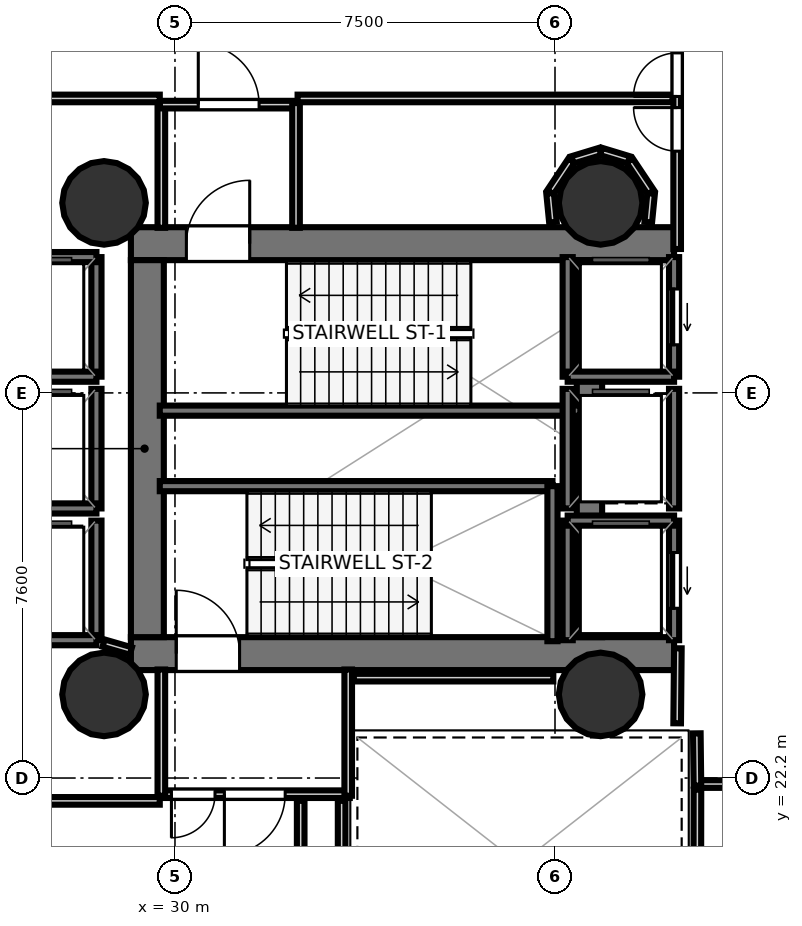
"""IFC4 building model, lengths in metres.
Left out: names, types, materials, properties, quantities, classifications, styles, units other than length and angle.
Written with IfcOpenShell. Run it as: python <this file> out.ifc"""

import sys

from ifc_helpers import new_model, si_unit, direction, frame, frame_2d, origin, origin_2d, place, context, subcontext, project, spatial, rectangle, hollow_circle, extrude, element, fill, save


model = new_model("IFC4")
c1 = context("Model", 3, precision=1e-05, world=origin(), true_north=direction((0.0, 1.0)))
c2 = subcontext(c1, "Body", "Model", "MODEL_VIEW")
j1 = project(units=[si_unit("LENGTHUNIT", "METRE"), si_unit("PLANEANGLEUNIT", "RADIAN")], contexts=[c1])
p1 = place(None, origin())
s1 = spatial("IfcSite", under=j1, at=p1, CompositionType="ELEMENT")
p2 = place(p1, origin())
s2 = spatial("IfcBuilding", under=s1, at=p2, CompositionType="ELEMENT")
p3 = place(p2, frame((0.0, 0.0, 93.2)))
s3 = spatial("IfcBuildingStorey", under=s2, at=p3, CompositionType="ELEMENT", Elevation=93.2)
p4 = place(p3, frame((29.13, 32.745, 0.0), z_axis=(0.0, 0.0, 1.0), x_axis=(1.0, 0.0, 0.0)))
e1 = element("IfcWall", 1, at=p4, inside=s3, PredefinedType="SHEAR", context=c2, shape_type="SweptSolid", body=[
    extrude(rectangle(XDim=10.72, YDim=0.65, at=frame_2d((5.36, 0.0))), origin(), (0.0, 0.0, 1.0), 4.42),
])
p5 = place(p4, frame((1.095, 0.0, 0.0)))
e2 = element("IfcOpeningElement", 2, at=p5, cuts=e1, PredefinedType="OPENING", context=c2, shape_type="SweptSolid", body=[
    extrude(rectangle(XDim=1.25, YDim=2.15, at=frame_2d((0.625, 1.075))), frame((0.0, 0.335, 0.0), z_axis=(0.0, -1.0, 0.0), x_axis=(1.0, 0.0, 0.0)), (0.0, 0.0, 1.0), 0.67),
])
p6 = place(p3, frame((29.13, 24.655, 0.0), z_axis=(0.0, 0.0, 1.0), x_axis=(1.0, 0.0, 0.0)))
e3 = element("IfcWall", 3, at=p6, inside=s3, PredefinedType="SHEAR", context=c2, shape_type="SweptSolid", body=[
    extrude(rectangle(XDim=10.72, YDim=0.65, at=frame_2d((5.36, 0.0))), origin(), (0.0, 0.0, 1.0), 4.42),
])
p7 = place(p6, frame((0.895, 0.0, 0.0)))
e4 = element("IfcOpeningElement", 4, at=p7, cuts=e3, PredefinedType="OPENING", context=c2, shape_type="SweptSolid", body=[
    extrude(rectangle(XDim=1.25, YDim=2.15, at=frame_2d((0.625, 1.075))), frame((0.0, 0.335, 0.0), z_axis=(0.0, -1.0, 0.0), x_axis=(1.0, 0.0, 0.0)), (0.0, 0.0, 1.0), 0.67),
])
p8 = place(p3, frame((29.455, 24.98, 0.0), z_axis=(0.0, 0.0, 1.0), x_axis=(0.0, 1.0, 0.0)))
e5 = element("IfcWall", 5, at=p8, inside=s3, PredefinedType="SHEAR", context=c2, shape_type="SweptSolid", body=[
    extrude(rectangle(XDim=7.44, YDim=0.65, at=frame_2d((3.72, 0.0))), origin(), (0.0, 0.0, 1.0), 4.42),
])
p9 = place(p3, frame((38.18, 24.98, 0.0), z_axis=(0.0, 0.0, 1.0), x_axis=(0.0, 1.0, 0.0)))
e6 = element("IfcWall", 6, at=p9, inside=s3, PredefinedType="SHEAR", context=c2, shape_type="SweptSolid", body=[
    extrude(rectangle(XDim=7.44, YDim=0.5, at=frame_2d((3.72, 0.0))), origin(), (0.0, 0.0, 1.0), 4.42),
])
for number, where, z_axis, x_axis in (
    (7, (28.6, 33.55, 0.0), (0.0, 0.0, 1.0), (1.0, 0.0, 0.0)),
    (8, (28.6, 23.85, 0.0), (0.0, 0.0, 1.0), (1.0, 0.0, 0.0)),
    (9, (38.4, 33.55, 0.0), (0.0, 0.0, 1.0), (1.0, 0.0, 0.0)),
    (10, (38.4, 23.85, 0.0), (0.0, 0.0, 1.0), (1.0, 0.0, 0.0)),
):
    element("IfcColumn", number, at=place(p3, frame(where, z_axis=z_axis, x_axis=x_axis)), inside=s3, PredefinedType="COLUMN", context=c2, shape_type="SweptSolid", body=[
        extrude(hollow_circle(Radius=0.825, WallThickness=0.04, at=origin_2d()), origin(), (0.0, 0.0, 1.0), 4.6),
    ])
p10 = place(p3, frame((29.7, 29.45, 0.0), z_axis=(0.0, 0.0, 1.0), x_axis=(1.0, 0.0, 0.0)))
e11 = element("IfcWall", 11, at=p10, inside=s3, PredefinedType="SOLIDWALL", context=c2, shape_type="SweptSolid", body=[
    extrude(rectangle(XDim=8.3, YDim=0.2, at=frame_2d((4.15, 0.0))), origin(), (0.0, 0.0, 1.0), 4.42),
])
p11 = place(p3, frame((29.7, 27.96, 0.0), z_axis=(0.0, 0.0, 1.0), x_axis=(1.0, 0.0, 0.0)))
e12 = element("IfcWall", 12, at=p11, inside=s3, PredefinedType="SOLIDWALL", context=c2, shape_type="SweptSolid", body=[
    extrude(rectangle(XDim=7.75, YDim=0.2, at=frame_2d((3.875, 0.0))), origin(), (0.0, 0.0, 1.0), 4.42),
])
p12 = place(p3, frame((37.45, 24.9, 0.0), z_axis=(0.0, 0.0, 1.0), x_axis=(0.0, 1.0, 0.0)))
e13 = element("IfcWall", 13, at=p12, inside=s3, PredefinedType="SOLIDWALL", context=c2, shape_type="SweptSolid", body=[
    extrude(rectangle(XDim=3.06, YDim=0.2, at=frame_2d((1.53, 0.0))), origin(), (0.0, 0.0, 1.0), 4.42),
])
p13 = place(p3, frame((39.85, 30.12, 0.0), z_axis=(0.0, 0.0, 1.0), x_axis=(0.0, 1.0, 0.0)))
e14 = element("IfcWall", 14, at=p13, inside=s3, PredefinedType="SOLIDWALL", context=c2, shape_type="SweptSolid", body=[
    extrude(rectangle(XDim=2.36, YDim=0.2, at=frame_2d((1.18, 0.0))), origin(), (0.0, 0.0, 1.0), 4.42),
])
p14 = place(p13, frame((0.63, 0.0, 0.0)))
e15 = element("IfcOpeningElement", 15, at=p14, cuts=e14, PredefinedType="OPENING", context=c2, shape_type="SweptSolid", body=[
    extrude(rectangle(XDim=1.1, YDim=2.15, at=frame_2d((0.55, 1.075))), frame((0.0, 0.11, 0.0), z_axis=(0.0, -1.0, 0.0), x_axis=(1.0, 0.0, 0.0)), (0.0, 0.0, 1.0), 0.22),
])
p15 = place(p3, frame((37.75, 30.12, 0.0), z_axis=(0.0, 0.0, 1.0), x_axis=(0.0, 1.0, 0.0)))
e16 = element("IfcWall", 16, at=p15, inside=s3, PredefinedType="SOLIDWALL", context=c2, shape_type="SweptSolid", body=[
    extrude(rectangle(XDim=2.36, YDim=0.2, at=frame_2d((1.18, 0.0))), origin(), (0.0, 0.0, 1.0), 4.42),
])
p16 = place(p3, frame((37.75, 30.12, 0.0), z_axis=(0.0, 0.0, 1.0), x_axis=(1.0, 0.0, 0.0)))
e17 = element("IfcWall", 17, at=p16, inside=s3, PredefinedType="SOLIDWALL", context=c2, shape_type="SweptSolid", body=[
    extrude(rectangle(XDim=2.1, YDim=0.2, at=frame_2d((1.05, 0.0))), origin(), (0.0, 0.0, 1.0), 4.42),
])
p17 = place(p3, frame((39.85, 24.92, 0.0), z_axis=(0.0, 0.0, 1.0), x_axis=(0.0, 1.0, 0.0)))
e18 = element("IfcWall", 18, at=p17, inside=s3, PredefinedType="SOLIDWALL", context=c2, shape_type="SweptSolid", body=[
    extrude(rectangle(XDim=2.36, YDim=0.2, at=frame_2d((1.18, 0.0))), origin(), (0.0, 0.0, 1.0), 4.42),
])
p18 = place(p17, frame((0.63, 0.0, 0.0)))
e19 = element("IfcOpeningElement", 19, at=p18, cuts=e18, PredefinedType="OPENING", context=c2, shape_type="SweptSolid", body=[
    extrude(rectangle(XDim=1.1, YDim=2.15, at=frame_2d((0.55, 1.075))), frame((0.0, 0.11, 0.0), z_axis=(0.0, -1.0, 0.0), x_axis=(1.0, 0.0, 0.0)), (0.0, 0.0, 1.0), 0.22),
])
p19 = place(p3, frame((37.75, 24.92, 0.0), z_axis=(0.0, 0.0, 1.0), x_axis=(0.0, 1.0, 0.0)))
e20 = element("IfcWall", 20, at=p19, inside=s3, PredefinedType="SOLIDWALL", context=c2, shape_type="SweptSolid", body=[
    extrude(rectangle(XDim=2.36, YDim=0.2, at=frame_2d((1.18, 0.0))), origin(), (0.0, 0.0, 1.0), 4.42),
])
p20 = place(p3, frame((37.75, 27.28, 0.0), z_axis=(0.0, 0.0, 1.0), x_axis=(1.0, 0.0, 0.0)))
e21 = element("IfcWall", 21, at=p20, inside=s3, PredefinedType="SOLIDWALL", context=c2, shape_type="SweptSolid", body=[
    extrude(rectangle(XDim=2.1, YDim=0.2, at=frame_2d((1.05, 0.0))), origin(), (0.0, 0.0, 1.0), 4.42),
])
p21 = place(p3, frame((28.45, 30.12, 0.0), z_axis=(0.0, 0.0, 1.0), x_axis=(0.0, 1.0, 0.0)))
e22 = element("IfcWall", 22, at=p21, inside=s3, PredefinedType="SOLIDWALL", context=c2, shape_type="SweptSolid", body=[
    extrude(rectangle(XDim=2.36, YDim=0.2, at=frame_2d((1.18, 0.0))), origin(), (0.0, 0.0, 1.0), 4.42),
])
for number, where, z_axis, x_axis in (
    (23, (26.35, 32.48, 0.0), (0.0, 0.0, 1.0), (1.0, 0.0, 0.0)),
    (24, (26.35, 30.12, 0.0), (0.0, 0.0, 1.0), (1.0, 0.0, 0.0)),
):
    element("IfcWall", number, at=place(p3, frame(where, z_axis=z_axis, x_axis=x_axis)), inside=s3, PredefinedType="SOLIDWALL", context=c2, shape_type="SweptSolid", body=[
        extrude(rectangle(XDim=2.1, YDim=0.2, at=frame_2d((1.05, 0.0))), origin(), (0.0, 0.0, 1.0), 4.42),
    ])
p22 = place(p3, frame((28.45, 27.52, 0.0), z_axis=(0.0, 0.0, 1.0), x_axis=(0.0, 1.0, 0.0)))
e25 = element("IfcWall", 25, at=p22, inside=s3, PredefinedType="SOLIDWALL", context=c2, shape_type="SweptSolid", body=[
    extrude(rectangle(XDim=2.36, YDim=0.2, at=frame_2d((1.18, 0.0))), origin(), (0.0, 0.0, 1.0), 4.42),
])
p23 = place(p3, frame((26.35, 27.52, 0.0), z_axis=(0.0, 0.0, 1.0), x_axis=(1.0, 0.0, 0.0)))
e26 = element("IfcWall", 26, at=p23, inside=s3, PredefinedType="SOLIDWALL", context=c2, shape_type="SweptSolid", body=[
    extrude(rectangle(XDim=2.1, YDim=0.2, at=frame_2d((1.05, 0.0))), origin(), (0.0, 0.0, 1.0), 4.42),
])
p24 = place(p3, frame((28.45, 24.92, 0.0), z_axis=(0.0, 0.0, 1.0), x_axis=(0.0, 1.0, 0.0)))
e27 = element("IfcWall", 27, at=p24, inside=s3, PredefinedType="SOLIDWALL", context=c2, shape_type="SweptSolid", body=[
    extrude(rectangle(XDim=2.36, YDim=0.2, at=frame_2d((1.18, 0.0))), origin(), (0.0, 0.0, 1.0), 4.42),
])
p25 = place(p3, frame((26.35, 24.92, 0.0), z_axis=(0.0, 0.0, 1.0), x_axis=(1.0, 0.0, 0.0)))
e28 = element("IfcWall", 28, at=p25, inside=s3, PredefinedType="SOLIDWALL", context=c2, shape_type="SweptSolid", body=[
    extrude(rectangle(XDim=2.1, YDim=0.2, at=frame_2d((1.05, 0.0))), origin(), (0.0, 0.0, 1.0), 4.42),
])
for number, where, z_axis, x_axis in (
    (29, (39.85, 27.52, 0.0), (0.0, 0.0, 1.0), (0.0, 1.0, 0.0)),
    (30, (37.75, 27.52, 0.0), (0.0, 0.0, 1.0), (0.0, 1.0, 0.0)),
):
    element("IfcWall", number, at=place(p3, frame(where, z_axis=z_axis, x_axis=x_axis)), inside=s3, PredefinedType="SOLIDWALL", context=c2, shape_type="SweptSolid", body=[
        extrude(rectangle(XDim=2.36, YDim=0.2, at=frame_2d((1.18, 0.0))), origin(), (0.0, 0.0, 1.0), 4.42),
    ])
p26 = place(p3, frame((29.731, 33.058, 0.0), z_axis=(0.0, 0.0, 1.0), x_axis=(0.0, 1.0, 0.0)))
e31 = element("IfcWall", 31, at=p26, inside=s3, PredefinedType="PARTITIONING", context=c2, shape_type="SweptSolid", body=[
    extrude(rectangle(XDim=2.462, YDim=0.15, at=frame_2d((1.231, 0.0))), origin(), (0.0, 0.0, 1.0), 2.94),
])
p27 = place(p3, frame((29.7, 35.489, 0.0), z_axis=(0.0, 0.0, 1.0), x_axis=(1.0, 0.0, 0.0)))
e32 = element("IfcWall", 32, at=p27, inside=s3, PredefinedType="PARTITIONING", context=c2, shape_type="SweptSolid", body=[
    extrude(rectangle(XDim=2.72, YDim=0.15, at=frame_2d((1.36, 0.0))), origin(), (0.0, 0.0, 1.0), 2.94),
])
p28 = place(p27, frame((0.76, 0.0, 0.0)))
e33 = element("IfcOpeningElement", 33, at=p28, cuts=e32, PredefinedType="OPENING", context=c2, shape_type="SweptSolid", body=[
    extrude(rectangle(XDim=1.2, YDim=2.15, at=frame_2d((0.6, 1.075))), frame((0.0, 0.085, 0.0), z_axis=(0.0, -1.0, 0.0), x_axis=(1.0, 0.0, 0.0)), (0.0, 0.0, 1.0), 0.17),
])
p29 = place(p3, frame((32.389, 35.52, 0.0), z_axis=(0.0, 0.0, 1.0), x_axis=(0.0, -1.0, 0.0)))
e34 = element("IfcWall", 34, at=p29, inside=s3, PredefinedType="PARTITIONING", context=c2, shape_type="SweptSolid", body=[
    extrude(rectangle(XDim=2.462, YDim=0.15, at=frame_2d((1.231, 0.0))), origin(), (0.0, 0.0, 1.0), 2.94),
])
p30 = place(p3, frame((33.45, 21.881, 0.0), z_axis=(0.0, 0.0, 1.0), x_axis=(-1.0, 0.0, 0.0)))
e35 = element("IfcWall", 35, at=p30, inside=s3, PredefinedType="PARTITIONING", context=c2, shape_type="SweptSolid", body=[
    extrude(rectangle(XDim=3.75, YDim=0.15, at=frame_2d((1.875, 0.0))), origin(), (0.0, 0.0, 1.0), 2.94),
])
p31 = place(p30, frame((1.275, 0.0, 0.0)))
e36 = element("IfcOpeningElement", 36, at=p31, cuts=e35, PredefinedType="OPENING", context=c2, shape_type="SweptSolid", body=[
    extrude(rectangle(XDim=1.2, YDim=2.15, at=frame_2d((0.6, 1.075))), frame((0.0, 0.085, 0.0), z_axis=(0.0, -1.0, 0.0), x_axis=(1.0, 0.0, 0.0)), (0.0, 0.0, 1.0), 0.17),
])
p32 = place(p30, frame((2.66, 0.0, 0.0)))
e37 = element("IfcOpeningElement", 37, at=p32, cuts=e35, PredefinedType="OPENING", context=c2, shape_type="SweptSolid", body=[
    extrude(rectangle(XDim=0.86, YDim=2.05, at=frame_2d((0.43, 1.025))), frame((0.0, 0.085, 0.0), z_axis=(0.0, -1.0, 0.0), x_axis=(1.0, 0.0, 0.0)), (0.0, 0.0, 1.0), 0.17),
])
for number, where, z_axis, x_axis in (
    (38, (29.731, 21.85, 0.0), (0.0, 0.0, 1.0), (0.0, 1.0, 0.0)),
    (39, (33.419, 24.342, 0.0), (0.0, 0.0, 1.0), (0.0, -1.0, 0.0)),
):
    element("IfcWall", number, at=place(p3, frame(where, z_axis=z_axis, x_axis=x_axis)), inside=s3, PredefinedType="PARTITIONING", context=c2, shape_type="SweptSolid", body=[
        extrude(rectangle(XDim=2.492, YDim=0.15, at=frame_2d((1.246, 0.0))), origin(), (0.0, 0.0, 1.0), 2.94),
    ])
p33 = place(p3, frame((39.911, 32.64, 0.0), z_axis=(0.0, 0.0, 1.0), x_axis=(0.0, 1.0, 0.0)))
e40 = element("IfcWall", 40, at=p33, inside=s3, PredefinedType="PARTITIONING", context=c2, shape_type="SweptSolid", body=[
    extrude(rectangle(XDim=4.01, YDim=0.15, at=frame_2d((2.005, 0.0))), origin(), (0.0, 0.0, 1.0), 2.94),
])
p34 = place(p33, frame((3.01, 0.0, 0.0)))
e41 = element("IfcOpeningElement", 41, at=p34, cuts=e40, PredefinedType="OPENING", context=c2, shape_type="SweptSolid", body=[
    extrude(rectangle(XDim=0.86, YDim=2.05, at=frame_2d((0.43, 1.025))), frame((0.0, 0.085, 0.0), z_axis=(0.0, -1.0, 0.0), x_axis=(1.0, 0.0, 0.0)), (0.0, 0.0, 1.0), 0.17),
])
p35 = place(p33, frame((1.93, 0.0, 0.0)))
e42 = element("IfcOpeningElement", 42, at=p35, cuts=e40, PredefinedType="OPENING", context=c2, shape_type="SweptSolid", body=[
    extrude(rectangle(XDim=0.86, YDim=2.05, at=frame_2d((0.43, 1.025))), frame((0.0, 0.085, 0.0), z_axis=(0.0, -1.0, 0.0), x_axis=(1.0, 0.0, 0.0)), (0.0, 0.0, 1.0), 0.17),
])
p36 = place(p3, frame((41.36, 22.081, 0.0), z_axis=(0.0, 0.0, 1.0), x_axis=(-1.0, 0.0, 0.0)))
e43 = element("IfcWall", 43, at=p36, inside=s3, PredefinedType="PARTITIONING", context=c2, shape_type="SweptSolid", body=[
    extrude(rectangle(XDim=1.08, YDim=0.15, at=frame_2d((0.54, 0.0))), origin(), (0.0, 0.0, 1.0), 2.94),
])
p37 = place(p3, frame((40.311, 22.05, 0.0), z_axis=(0.0, 0.0, 1.0), x_axis=(-0.011836292006, 0.999929948642, 0.0)))
e44 = element("IfcWall", 44, at=p37, inside=s3, PredefinedType="PARTITIONING", context=c2, shape_type="SweptSolid", body=[
    extrude(rectangle(XDim=1.031, YDim=0.15, at=frame_2d((0.516, 0.0))), origin(), (0.0, 0.0, 1.0), 2.94),
])
p38 = place(p3, frame((39.911, 23.28, 0.0), z_axis=(0.0, 0.0, 1.0), x_axis=(0.009397771291, 0.999955839972, 0.0)))
e45 = element("IfcWall", 45, at=p38, inside=s3, PredefinedType="PARTITIONING", context=c2, shape_type="SweptSolid", body=[
    extrude(rectangle(XDim=1.481, YDim=0.15, at=frame_2d((0.74, 0.0))), origin(), (0.0, 0.0, 1.0), 2.94),
])
p39 = place(p3, frame((29.13, 24.706, 0.0), z_axis=(0.0, 0.0, 1.0), x_axis=(-0.960451214223, 0.278448316742, 0.0)))
e46 = element("IfcWall", 46, at=p39, inside=s3, PredefinedType="PARTITIONING", context=c2, shape_type="SweptSolid", body=[
    extrude(rectangle(XDim=0.562, YDim=0.15, at=frame_2d((0.281, 0.0))), origin(), (0.0, 0.0, 1.0), 2.94),
])
p40 = place(p3, frame((37.467, 24.181, 0.0), z_axis=(0.0, 0.0, 1.0), x_axis=(-1.0, 0.0, 0.0)))
e47 = element("IfcWall", 47, at=p40, inside=s3, PredefinedType="PARTITIONING", context=c2, shape_type="SweptSolid", body=[
    extrude(rectangle(XDim=3.937, YDim=0.15, at=frame_2d((1.968, 0.0))), origin(), (0.0, 0.0, 1.0), 2.94),
])
p41 = place(p3, frame((32.481, 17.65, 0.0), z_axis=(0.0, 0.0, 1.0), x_axis=(0.0, 1.0, 0.0)))
e48 = element("IfcWall", 48, at=p41, inside=s3, PredefinedType="PARTITIONING", context=c2, shape_type="SweptSolid", body=[
    extrude(rectangle(XDim=4.1, YDim=0.15, at=frame_2d((2.05, 0.0))), origin(), (0.0, 0.0, 1.0), 2.94),
])
p42 = place(p41, frame((1.45, 0.0, 0.0)))
e49 = element("IfcOpeningElement", 49, at=p42, cuts=e48, PredefinedType="OPENING", context=c2, shape_type="SweptSolid", body=[
    extrude(rectangle(XDim=1.2, YDim=2.15, at=frame_2d((0.6, 1.075))), frame((0.0, 0.085, 0.0), z_axis=(0.0, -1.0, 0.0), x_axis=(1.0, 0.0, 0.0)), (0.0, 0.0, 1.0), 0.17),
])
p43 = place(p3, frame((33.289, 21.75, 0.0), z_axis=(0.0, 0.0, 1.0), x_axis=(0.0, -1.0, 0.0)))
e50 = element("IfcWall", 50, at=p43, inside=s3, PredefinedType="PARTITIONING", context=c2, shape_type="SweptSolid", body=[
    extrude(rectangle(XDim=3.75, YDim=0.15, at=frame_2d((1.875, 0.0))), origin(), (0.0, 0.0, 1.0), 2.94),
])
p44 = place(p3, frame((39.818, 35.611, 0.0), z_axis=(0.0, 0.0, 1.0), x_axis=(-1.0, 0.0, 0.0)))
e51 = element("IfcWall", 51, at=p44, inside=s3, PredefinedType="PARTITIONING", context=c2, shape_type="SweptSolid", body=[
    extrude(rectangle(XDim=7.398, YDim=0.15, at=frame_2d((3.699, 0.0))), origin(), (0.0, 0.0, 1.0), 2.94),
])
for number, where, z_axis, x_axis in (
    (52, (29.7, 35.611, 0.0), (0.0, 0.0, 1.0), (-1.0, 0.0, 0.0)),
    (53, (26.45, 21.749, 0.0), (0.0, 0.0, 1.0), (1.0, 0.0, 0.0)),
):
    element("IfcWall", number, at=place(p3, frame(where, z_axis=z_axis, x_axis=x_axis)), inside=s3, PredefinedType="PARTITIONING", context=c2, shape_type="SweptSolid", body=[
        extrude(rectangle(XDim=3.25, YDim=0.15, at=frame_2d((1.625, 0.0))), origin(), (0.0, 0.0, 1.0), 2.94),
    ])
p45 = place(p3, frame((40.306, 17.945, 0.0), z_axis=(0.0, 0.0, 1.0), x_axis=(0.001334545369, 0.999999109494, 0.0)))
e54 = element("IfcWall", 54, at=p45, inside=s3, PredefinedType="PARTITIONING", context=c2, shape_type="SweptSolid", body=[
    extrude(rectangle(XDim=4.025, YDim=0.15, at=frame_2d((2.012, 0.0))), origin(), (0.0, 0.0, 1.0), 2.94),
])
p46 = place(p3, frame((39.341, 33.17, 0.0), z_axis=(0.0, 0.0, 1.0), x_axis=(0.098193262045, 0.995167364461, 0.0)))
e55 = element("IfcWall", 55, at=p46, inside=s3, PredefinedType="PARTITIONING", context=c2, shape_type="SweptSolid", body=[
    extrude(rectangle(XDim=0.572, YDim=0.15, at=frame_2d((0.286, 0.0))), origin(), (0.0, 0.0, 1.0), 2.94),
])
p47 = place(p3, frame((39.392, 33.76, 0.0), z_axis=(0.0, 0.0, 1.0), x_axis=(-0.555746078923, 0.831352088926, 0.0)))
e56 = element("IfcWall", 56, at=p47, inside=s3, PredefinedType="PARTITIONING", context=c2, shape_type="SweptSolid", body=[
    extrude(rectangle(XDim=0.754, YDim=0.15, at=frame_2d((0.377, 0.0))), origin(), (0.0, 0.0, 1.0), 2.94),
])
for number, where, z_axis, x_axis in (
    (57, (38.956, 34.399, 0.0), (0.0, 0.0, 1.0), (-0.957, 0.29, 0.0)),
    (58, (38.391, 34.565, 0.0), (0.0, 0.0, 1.0), (-0.957, -0.29, 0.0)),
):
    element("IfcWall", number, at=place(p3, frame(where, z_axis=z_axis, x_axis=x_axis)), inside=s3, PredefinedType="PARTITIONING", context=c2, shape_type="SweptSolid", body=[
        extrude(rectangle(XDim=0.572, YDim=0.15, at=frame_2d((0.286, 0.0))), origin(), (0.0, 0.0, 1.0), 2.94),
    ])
p48 = place(p3, frame((37.827, 34.386, 0.0), z_axis=(0.0, 0.0, 1.0), x_axis=(-0.555522182913, -0.831501716349, 0.0)))
e59 = element("IfcWall", 59, at=p48, inside=s3, PredefinedType="PARTITIONING", context=c2, shape_type="SweptSolid", body=[
    extrude(rectangle(XDim=0.754, YDim=0.15, at=frame_2d((0.377, 0.0))), origin(), (0.0, 0.0, 1.0), 2.94),
])
p49 = place(p3, frame((37.403, 33.739, 0.0), z_axis=(0.0, 0.0, 1.0), x_axis=(0.097770424665, -0.995208995167, 0.0)))
e60 = element("IfcWall", 60, at=p49, inside=s3, PredefinedType="PARTITIONING", context=c2, shape_type="SweptSolid", body=[
    extrude(rectangle(XDim=0.572, YDim=0.15, at=frame_2d((0.286, 0.0))), origin(), (0.0, 0.0, 1.0), 2.94),
])
p50 = place(p5, origin())
e61 = element("IfcDoor", 61, at=p50, inside=s3, OperationType="SINGLE_SWING_RIGHT", PredefinedType="DOOR", context=c2, shape_type="SweptSolid", body=[
    extrude(rectangle(XDim=1.25, YDim=2.15, at=frame_2d((0.625, 1.075))), frame((0.0, 0.025, 0.0), z_axis=(0.0, -1.0, 0.0), x_axis=(1.0, 0.0, 0.0)), (0.0, 0.0, 1.0), 0.05),
])
fill(e2, e61)
p51 = place(p7, origin())
e62 = element("IfcDoor", 62, at=p51, inside=s3, OperationType="SINGLE_SWING_LEFT", PredefinedType="DOOR", context=c2, shape_type="SweptSolid", body=[
    extrude(rectangle(XDim=1.25, YDim=2.15, at=frame_2d((0.625, 1.075))), frame((0.0, 0.025, 0.0), z_axis=(0.0, -1.0, 0.0), x_axis=(1.0, 0.0, 0.0)), (0.0, 0.0, 1.0), 0.05),
])
fill(e4, e62)
p52 = place(p14, origin())
e63 = element("IfcDoor", 63, at=p52, inside=s3, OperationType="SLIDING_TO_LEFT", PredefinedType="DOOR", context=c2, shape_type="SweptSolid", body=[
    extrude(rectangle(XDim=1.1, YDim=2.15, at=frame_2d((0.55, 1.075))), frame((0.0, 0.025, 0.0), z_axis=(0.0, -1.0, 0.0), x_axis=(1.0, 0.0, 0.0)), (0.0, 0.0, 1.0), 0.05),
])
fill(e15, e63)
p53 = place(p18, origin())
e64 = element("IfcDoor", 64, at=p53, inside=s3, OperationType="SLIDING_TO_LEFT", PredefinedType="DOOR", context=c2, shape_type="SweptSolid", body=[
    extrude(rectangle(XDim=1.1, YDim=2.15, at=frame_2d((0.55, 1.075))), frame((0.0, 0.025, 0.0), z_axis=(0.0, -1.0, 0.0), x_axis=(1.0, 0.0, 0.0)), (0.0, 0.0, 1.0), 0.05),
])
fill(e19, e64)
p54 = place(p28, origin())
e65 = element("IfcDoor", 65, at=p54, inside=s3, OperationType="SINGLE_SWING_LEFT", PredefinedType="DOOR", context=c2, shape_type="SweptSolid", body=[
    extrude(rectangle(XDim=1.2, YDim=2.15, at=frame_2d((0.6, 1.075))), frame((0.0, 0.025, 0.0), z_axis=(0.0, -1.0, 0.0), x_axis=(1.0, 0.0, 0.0)), (0.0, 0.0, 1.0), 0.05),
])
fill(e33, e65)
p55 = place(p31, origin())
e66 = element("IfcDoor", 66, at=p55, inside=s3, OperationType="SINGLE_SWING_RIGHT", PredefinedType="DOOR", context=c2, shape_type="SweptSolid", body=[
    extrude(rectangle(XDim=1.2, YDim=2.15, at=frame_2d((0.6, 1.075))), frame((0.0, 0.025, 0.0), z_axis=(0.0, -1.0, 0.0), x_axis=(1.0, 0.0, 0.0)), (0.0, 0.0, 1.0), 0.05),
])
fill(e36, e66)
p56 = place(p34, origin())
e67 = element("IfcDoor", 67, at=p56, inside=s3, OperationType="SINGLE_SWING_LEFT", PredefinedType="DOOR", context=c2, shape_type="SweptSolid", body=[
    extrude(rectangle(XDim=0.86, YDim=2.05, at=frame_2d((0.43, 1.025))), frame((0.0, 0.025, 0.0), z_axis=(0.0, -1.0, 0.0), x_axis=(1.0, 0.0, 0.0)), (0.0, 0.0, 1.0), 0.05),
])
fill(e41, e67)
p57 = place(p32, origin())
e68 = element("IfcDoor", 68, at=p57, inside=s3, OperationType="SINGLE_SWING_RIGHT", PredefinedType="DOOR", context=c2, shape_type="SweptSolid", body=[
    extrude(rectangle(XDim=0.86, YDim=2.05, at=frame_2d((0.43, 1.025))), frame((0.0, 0.025, 0.0), z_axis=(0.0, -1.0, 0.0), x_axis=(1.0, 0.0, 0.0)), (0.0, 0.0, 1.0), 0.05),
])
fill(e37, e68)
p58 = place(p35, origin())
e69 = element("IfcDoor", 69, at=p58, inside=s3, OperationType="SINGLE_SWING_RIGHT", PredefinedType="DOOR", context=c2, shape_type="SweptSolid", body=[
    extrude(rectangle(XDim=0.86, YDim=2.05, at=frame_2d((0.43, 1.025))), frame((0.0, 0.025, 0.0), z_axis=(0.0, -1.0, 0.0), x_axis=(1.0, 0.0, 0.0)), (0.0, 0.0, 1.0), 0.05),
])
fill(e42, e69)
save(model, sys.argv[1])
